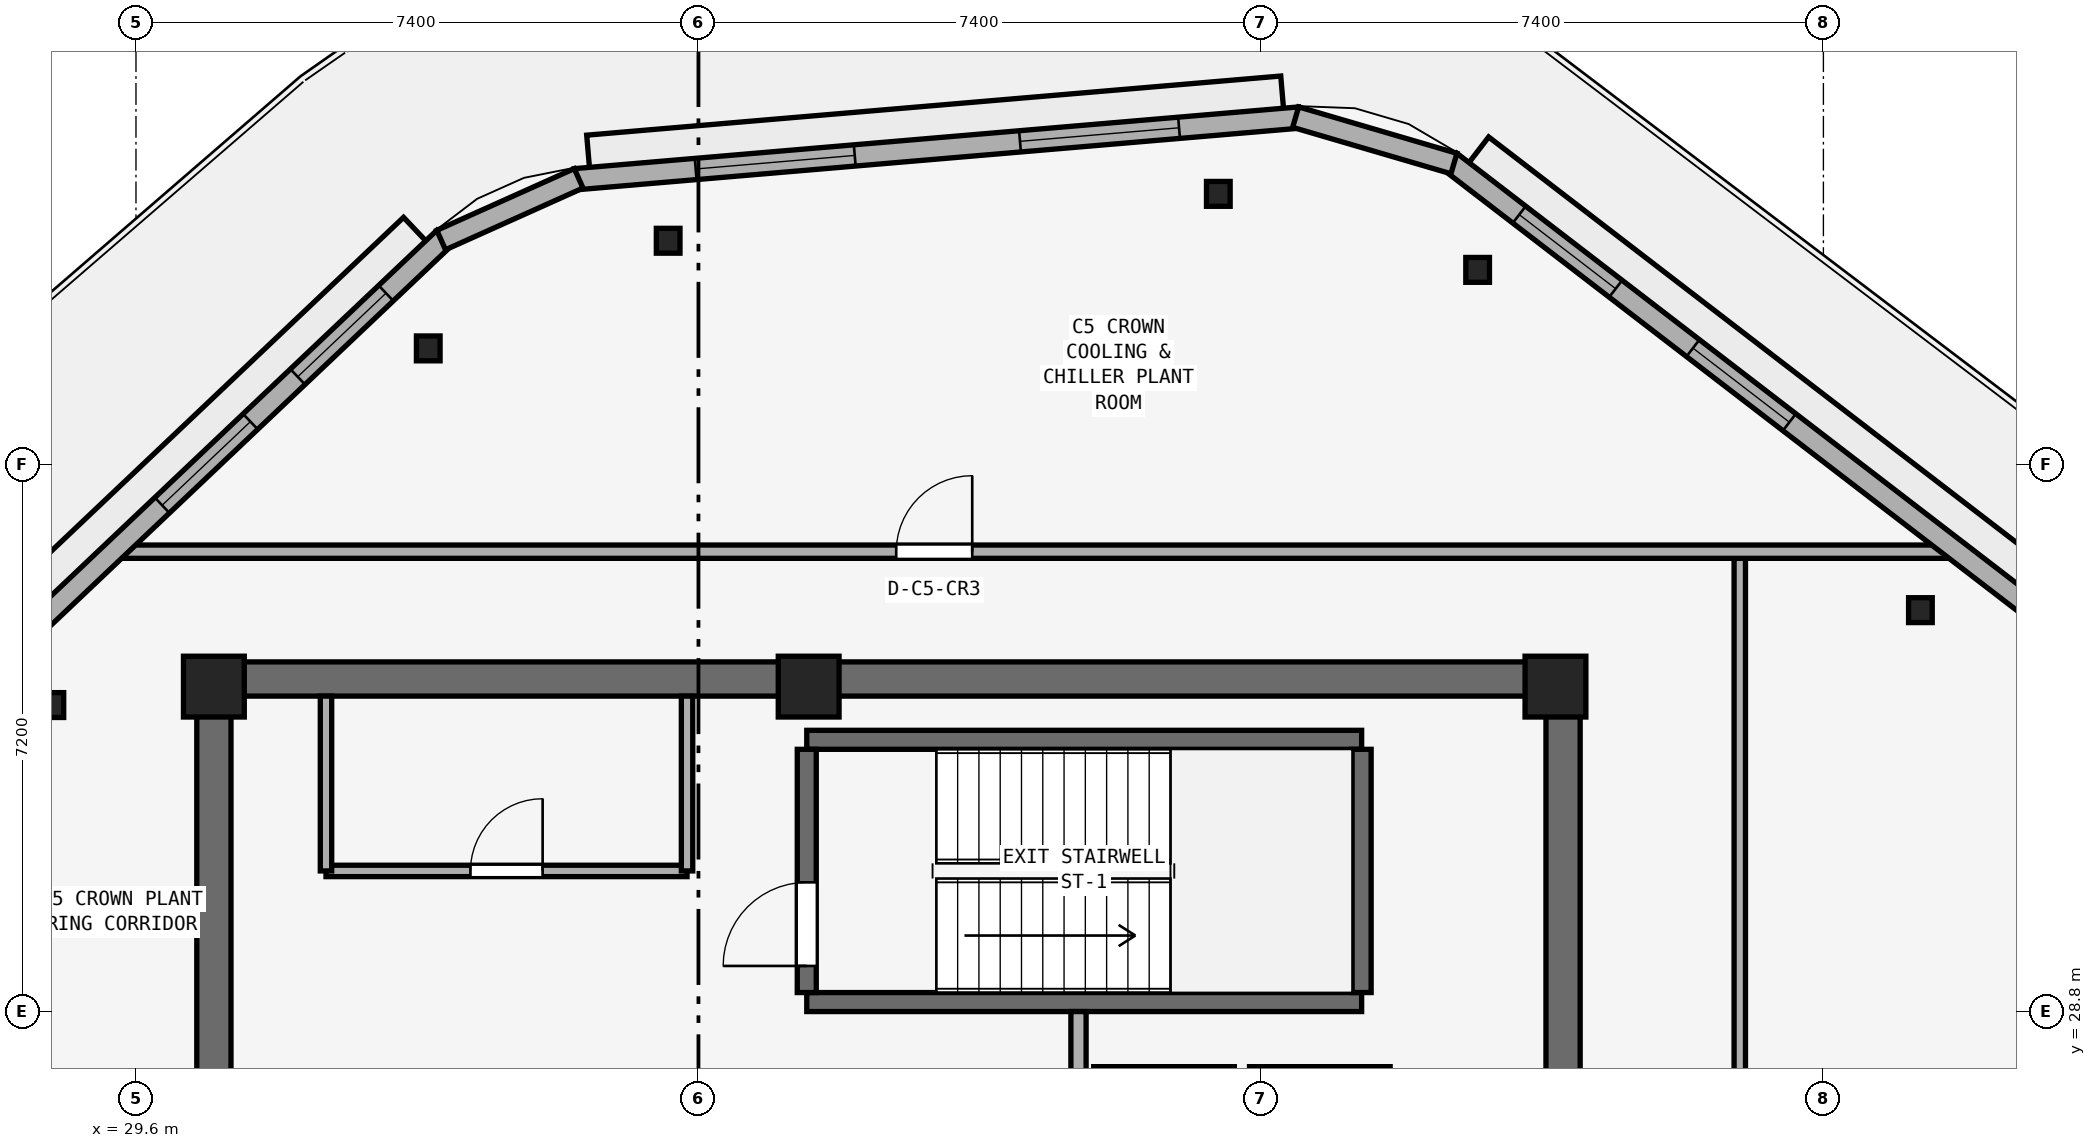
"""IFC4 building model, lengths in metres.
Left out: names, types, materials, properties, quantities, classifications, styles, units other than length and angle.
Written with IfcOpenShell. Run it as: python <this file> out.ifc"""

import sys

from ifc_helpers import new_model, si_unit, direction, frame, frame_2d, origin, origin_2d, place, context, subcontext, project, spatial, rectangle, i_section, extrude, element, fill, save


model = new_model("IFC4")
c1 = context("Model", 3, precision=1e-05, world=origin(), true_north=direction((0.0, 1.0)))
c2 = subcontext(c1, "Body", "Model", "MODEL_VIEW")
j1 = project(units=[si_unit("LENGTHUNIT", "METRE"), si_unit("PLANEANGLEUNIT", "RADIAN")], contexts=[c1])
p1 = place(None, origin())
s1 = spatial("IfcSite", under=j1, at=p1, CompositionType="ELEMENT")
p2 = place(p1, origin())
s2 = spatial("IfcBuilding", under=s1, at=p2, CompositionType="ELEMENT")
p3 = place(p2, frame((0.0, 0.0, 329.4)))
s3 = spatial("IfcBuildingStorey", under=s2, at=p3, CompositionType="ELEMENT", Elevation=329.4)
p4 = place(p3, frame((30.4, 33.175, 0.0), z_axis=(0.0, 0.0, 1.0), x_axis=(1.0, 0.0, 0.0)))
e1 = element("IfcWall", 1, at=p4, inside=s3, PredefinedType="SHEAR", context=c2, shape_type="SweptSolid", body=[
    extrude(rectangle(XDim=18.2, YDim=0.45, at=frame_2d((9.1, 0.0))), origin(), (0.0, 0.0, 1.0), 3.72),
])
p5 = place(p3, frame((30.625, 17.45, 0.0), z_axis=(0.0, 0.0, 1.0), x_axis=(0.0, 1.0, 0.0)))
e2 = element("IfcWall", 2, at=p5, inside=s3, PredefinedType="SHEAR", context=c2, shape_type="SweptSolid", body=[
    extrude(rectangle(XDim=15.5, YDim=0.45, at=frame_2d((7.75, 0.0))), origin(), (0.0, 0.0, 1.0), 3.72),
])
p6 = place(p5, frame((7.0, 0.0, 0.0)))
e3 = element("IfcOpeningElement", 3, at=p6, cuts=e2, PredefinedType="OPENING", context=c2, shape_type="SweptSolid", body=[
    extrude(rectangle(XDim=1.5, YDim=2.15, at=frame_2d((0.75, 1.075))), frame((0.0, 0.235, 0.0), z_axis=(0.0, -1.0, 0.0), x_axis=(1.0, 0.0, 0.0)), (0.0, 0.0, 1.0), 0.47),
])
p7 = place(p3, frame((48.375, 17.45, 0.0), z_axis=(0.0, 0.0, 1.0), x_axis=(0.0, 1.0, 0.0)))
e4 = element("IfcWall", 4, at=p7, inside=s3, PredefinedType="SHEAR", context=c2, shape_type="SweptSolid", body=[
    extrude(rectangle(XDim=15.5, YDim=0.45, at=frame_2d((7.75, 0.0))), origin(), (0.0, 0.0, 1.0), 3.72),
])
p8 = place(p7, frame((5.85, 0.0, 0.0)))
e5 = element("IfcOpeningElement", 5, at=p8, cuts=e4, PredefinedType="OPENING", context=c2, shape_type="SweptSolid", body=[
    extrude(rectangle(XDim=1.5, YDim=2.15, at=frame_2d((0.75, 1.075))), frame((0.0, 0.235, 0.0), z_axis=(0.0, -1.0, 0.0), x_axis=(1.0, 0.0, 0.0)), (0.0, 0.0, 1.0), 0.47),
])
for number, where, z_axis, x_axis in (
    (6, (48.275, 33.075, 0.0), (0.0, 0.0, 1.0), (1.0, 0.0, 0.0)),
    (7, (38.45, 33.075, 0.0), (0.0, 0.0, 1.0), (1.0, 0.0, 0.0)),
    (8, (30.625, 33.075, 0.0), (0.0, 0.0, 1.0), (1.0, 0.0, 0.0)),
):
    element("IfcColumn", number, at=place(p3, frame(where, z_axis=z_axis, x_axis=x_axis)), inside=s3, PredefinedType="PILASTER", context=c2, shape_type="SweptSolid", body=[
        extrude(rectangle(XDim=0.8, YDim=0.8, at=origin_2d()), origin(), (0.0, 0.0, 1.0), 4.0),
    ])
for number, where, z_axis, x_axis in (
    (9, (53.076, 34.081, 0.0), (0.0, 0.0, 1.0), (1.0, 0.0, 0.0)),
    (10, (47.251, 38.558, 0.0), (0.0, 0.0, 1.0), (1.0, 0.0, 0.0)),
    (11, (43.84, 39.557, 0.0), (0.0, 0.0, 1.0), (1.0, 0.0, 0.0)),
    (12, (36.602, 38.941, 0.0), (0.0, 0.0, 1.0), (1.0, 0.0, 0.0)),
    (13, (33.445, 37.524, 0.0), (0.0, 0.0, 1.0), (1.0, 0.0, 0.0)),
    (14, (28.493, 32.832, 0.0), (0.0, 0.0, 1.0), (1.0, 0.0, 0.0)),
):
    element("IfcColumn", number, at=place(p3, frame(where, z_axis=z_axis, x_axis=x_axis)), inside=s3, PredefinedType="COLUMN", context=c2, shape_type="SweptSolid", body=[
        extrude(i_section(OverallWidth=0.311, OverallDepth=0.327, WebThickness=0.016, FlangeThickness=0.025, at=origin_2d()), origin(), (0.0, 0.0, 1.0), 4.0),
    ])
for number, where, z_axis, x_axis in (
    (15, (38.425, 28.925, 0.0), (0.0, 0.0, 1.0), (1.0, 0.0, 0.0)),
    (16, (38.425, 32.375, 0.0), (0.0, 0.0, 1.0), (1.0, 0.0, 0.0)),
):
    element("IfcWall", number, at=place(p3, frame(where, z_axis=z_axis, x_axis=x_axis)), inside=s3, PredefinedType="SHEAR", context=c2, shape_type="SweptSolid", body=[
        extrude(rectangle(XDim=7.3, YDim=0.25, at=frame_2d((3.65, 0.0))), origin(), (0.0, 0.0, 1.0), 3.72),
    ])
p9 = place(p3, frame((38.425, 29.05, 0.0), z_axis=(0.0, 0.0, 1.0), x_axis=(0.0, 1.0, 0.0)))
e17 = element("IfcWall", 17, at=p9, inside=s3, PredefinedType="SHEAR", context=c2, shape_type="SweptSolid", body=[
    extrude(rectangle(XDim=3.2, YDim=0.25, at=frame_2d((1.6, 0.0))), origin(), (0.0, 0.0, 1.0), 3.72),
])
p10 = place(p9, frame((0.35, 0.0, 0.0)))
e18 = element("IfcOpeningElement", 18, at=p10, cuts=e17, PredefinedType="OPENING", context=c2, shape_type="SweptSolid", body=[
    extrude(rectangle(XDim=1.1, YDim=2.15, at=frame_2d((0.55, 1.075))), frame((0.0, 0.135, 0.0), z_axis=(0.0, -1.0, 0.0), x_axis=(1.0, 0.0, 0.0)), (0.0, 0.0, 1.0), 0.27),
])
p11 = place(p3, frame((45.725, 29.05, 0.0), z_axis=(0.0, 0.0, 1.0), x_axis=(0.0, 1.0, 0.0)))
e19 = element("IfcWall", 19, at=p11, inside=s3, PredefinedType="SHEAR", context=c2, shape_type="SweptSolid", body=[
    extrude(rectangle(XDim=3.2, YDim=0.25, at=frame_2d((1.6, 0.0))), origin(), (0.0, 0.0, 1.0), 3.72),
])
for number, where, z_axis, x_axis in (
    (20, (42.2, 27.95, 0.0), (0.0, 0.0, 1.0), (1.0, 0.0, 0.0)),
    (21, (44.25, 27.95, 0.0), (0.0, 0.0, 1.0), (1.0, 0.0, 0.0)),
):
    element("IfcWall", number, at=place(p3, frame(where, z_axis=z_axis, x_axis=x_axis)), inside=s3, PredefinedType="SHEAR", context=c2, shape_type="SweptSolid", body=[
        extrude(rectangle(XDim=1.85, YDim=0.25, at=frame_2d((0.925, 0.0))), origin(), (0.0, 0.0, 1.0), 3.72),
    ])
p12 = place(p3, frame((42.0, 22.75, 0.0), z_axis=(0.0, 0.0, 1.0), x_axis=(0.0, 1.0, 0.0)))
e22 = element("IfcWall", 22, at=p12, inside=s3, PredefinedType="SOLIDWALL", context=c2, shape_type="SweptSolid", body=[
    extrude(rectangle(XDim=6.05, YDim=0.2, at=frame_2d((3.025, 0.0))), origin(), (0.0, 0.0, 1.0), 3.72),
])
p13 = place(p12, frame((0.65, 0.0, 0.0)))
e23 = element("IfcOpeningElement", 23, at=p13, cuts=e22, PredefinedType="OPENING", context=c2, shape_type="SweptSolid", body=[
    extrude(rectangle(XDim=1.2, YDim=2.15, at=frame_2d((0.6, 1.075))), frame((0.0, 0.11, 0.0), z_axis=(0.0, -1.0, 0.0), x_axis=(1.0, 0.0, 0.0)), (0.0, 0.0, 1.0), 0.22),
])
p14 = place(p3, frame((32.1, 30.65, 0.0), z_axis=(0.0, 0.0, 1.0), x_axis=(1.0, 0.0, 0.0)))
e24 = element("IfcWall", 24, at=p14, inside=s3, PredefinedType="PARTITIONING", context=c2, shape_type="SweptSolid", body=[
    extrude(rectangle(XDim=4.75, YDim=0.15, at=frame_2d((2.375, 0.0))), origin(), (0.0, 0.0, 1.0), 3.72),
])
p15 = place(p14, frame((1.9, 0.0, 0.0)))
e25 = element("IfcOpeningElement", 25, at=p15, cuts=e24, PredefinedType="OPENING", context=c2, shape_type="SweptSolid", body=[
    extrude(rectangle(XDim=0.95, YDim=2.1, at=frame_2d((0.475, 1.05))), frame((0.0, 0.085, 0.0), z_axis=(0.0, -1.0, 0.0), x_axis=(1.0, 0.0, 0.0)), (0.0, 0.0, 1.0), 0.17),
])
for number, where, z_axis, x_axis in (
    (26, (32.1, 30.65, 0.0), (0.0, 0.0, 1.0), (0.0, 1.0, 0.0)),
    (27, (36.85, 30.65, 0.0), (0.0, 0.0, 1.0), (0.0, 1.0, 0.0)),
):
    element("IfcWall", number, at=place(p3, frame(where, z_axis=z_axis, x_axis=x_axis)), inside=s3, PredefinedType="PARTITIONING", context=c2, shape_type="SweptSolid", body=[
        extrude(rectangle(XDim=2.3, YDim=0.15, at=frame_2d((1.15, 0.0))), origin(), (0.0, 0.0, 1.0), 3.72),
    ])
p16 = place(p3, frame((50.7, 15.55, 0.0), z_axis=(0.0, 0.0, 1.0), x_axis=(0.0, 1.0, 0.0)))
e28 = element("IfcWall", 28, at=p16, inside=s3, PredefinedType="PARTITIONING", context=c2, shape_type="SweptSolid", body=[
    extrude(rectangle(XDim=19.3, YDim=0.15, at=frame_2d((9.65, 0.0))), origin(), (0.0, 0.0, 1.0), 3.72),
])
p17 = place(p16, frame((9.15, 0.0, 0.0)))
e29 = element("IfcOpeningElement", 29, at=p17, cuts=e28, PredefinedType="OPENING", context=c2, shape_type="SweptSolid", body=[
    extrude(rectangle(XDim=1.0, YDim=2.12, at=frame_2d((0.5, 1.06))), frame((0.0, 0.085, 0.0), z_axis=(0.0, -1.0, 0.0), x_axis=(1.0, 0.0, 0.0)), (0.0, 0.0, 1.0), 0.17),
])
p18 = place(p3, frame((29.236, 34.85, 0.0), z_axis=(0.0, 0.0, 1.0), x_axis=(1.0, 0.0, 0.0)))
e30 = element("IfcWall", 30, at=p18, inside=s3, PredefinedType="PARTITIONING", context=c2, shape_type="SweptSolid", body=[
    extrude(rectangle(XDim=24.422, YDim=0.175, at=frame_2d((12.211, 0.0))), origin(), (0.0, 0.0, 1.0), 3.72),
])
p19 = place(p18, frame((10.365, 0.0, 0.0)))
e31 = element("IfcOpeningElement", 31, at=p19, cuts=e30, PredefinedType="OPENING", context=c2, shape_type="SweptSolid", body=[
    extrude(rectangle(XDim=1.0, YDim=2.12, at=frame_2d((0.5, 1.06))), frame((0.0, 0.097, 0.0), z_axis=(0.0, -1.0, 0.0), x_axis=(1.0, 0.0, 0.0)), (0.0, 0.0, 1.0), 0.195),
])
p20 = place(p3, frame((54.543, 34.102, 0.0), z_axis=(0.0, 0.0, 1.0), x_axis=(-0.792926835332, 0.609316858302, 0.0)))
e32 = element("IfcWall", 32, at=p20, inside=s3, PredefinedType="STANDARD", context=c2, shape_type="SweptSolid", body=[
    extrude(rectangle(XDim=9.647, YDim=0.28, at=frame_2d((4.823, 0.0))), origin(), (0.0, 0.0, 1.0), 3.72),
])
p21 = place(p20, frame((4.023, 0.0, 0.9)))
e33 = element("IfcOpeningElement", 33, at=p21, cuts=e32, PredefinedType="OPENING", context=c2, shape_type="SweptSolid", body=[
    extrude(rectangle(XDim=1.6, YDim=1.45, at=frame_2d((0.8, 0.725))), frame((0.0, 0.15, 0.0), z_axis=(0.0, -1.0, 0.0), x_axis=(1.0, 0.0, 0.0)), (0.0, 0.0, 1.0), 0.3),
])
p22 = place(p20, frame((6.906, 0.0, 0.9)))
e34 = element("IfcOpeningElement", 34, at=p22, cuts=e32, PredefinedType="OPENING", context=c2, shape_type="SweptSolid", body=[
    extrude(rectangle(XDim=1.6, YDim=1.45, at=frame_2d((0.8, 0.725))), frame((0.0, 0.15, 0.0), z_axis=(0.0, -1.0, 0.0), x_axis=(1.0, 0.0, 0.0)), (0.0, 0.0, 1.0), 0.3),
])
p23 = place(p3, frame((44.908, 40.562, 0.0), z_axis=(0.0, 0.0, 1.0), x_axis=(-0.996389466658, -0.084900122101, 0.0)))
e35 = element("IfcWall", 35, at=p23, inside=s3, PredefinedType="STANDARD", context=c2, shape_type="SweptSolid", body=[
    extrude(rectangle(XDim=9.564, YDim=0.28, at=frame_2d((4.782, 0.0))), origin(), (0.0, 0.0, 1.0), 3.72),
])
p24 = place(p23, frame((1.591, 0.0, 0.9)))
e36 = element("IfcOpeningElement", 36, at=p24, cuts=e35, PredefinedType="OPENING", context=c2, shape_type="SweptSolid", body=[
    extrude(rectangle(XDim=2.1, YDim=1.7, at=frame_2d((1.05, 0.85))), frame((0.0, 0.15, 0.0), z_axis=(0.0, -1.0, 0.0), x_axis=(1.0, 0.0, 0.0)), (0.0, 0.0, 1.0), 0.3),
])
p25 = place(p23, frame((5.873, 0.0, 0.9)))
e37 = element("IfcOpeningElement", 37, at=p25, cuts=e35, PredefinedType="OPENING", context=c2, shape_type="SweptSolid", body=[
    extrude(rectangle(XDim=2.1, YDim=1.7, at=frame_2d((1.05, 0.85))), frame((0.0, 0.15, 0.0), z_axis=(0.0, -1.0, 0.0), x_axis=(1.0, 0.0, 0.0)), (0.0, 0.0, 1.0), 0.3),
])
p26 = place(p3, frame((33.654, 38.976, 0.0), z_axis=(0.0, 0.0, 1.0), x_axis=(-0.72588023988, -0.687821108539, 0.0)))
e38 = element("IfcWall", 38, at=p26, inside=s3, PredefinedType="STANDARD", context=c2, shape_type="SweptSolid", body=[
    extrude(rectangle(XDim=9.122, YDim=0.28, at=frame_2d((4.561, 0.0))), origin(), (0.0, 0.0, 1.0), 3.72),
])
p27 = place(p26, frame((1.054, 0.0, 0.9)))
e39 = element("IfcOpeningElement", 39, at=p27, cuts=e38, PredefinedType="OPENING", context=c2, shape_type="SweptSolid", body=[
    extrude(rectangle(XDim=1.6, YDim=1.45, at=frame_2d((0.8, 0.725))), frame((0.0, 0.15, 0.0), z_axis=(0.0, -1.0, 0.0), x_axis=(1.0, 0.0, 0.0)), (0.0, 0.0, 1.0), 0.3),
])
p28 = place(p26, frame((3.511, 0.0, 0.9)))
e40 = element("IfcOpeningElement", 40, at=p28, cuts=e38, PredefinedType="OPENING", context=c2, shape_type="SweptSolid", body=[
    extrude(rectangle(XDim=1.6, YDim=1.45, at=frame_2d((0.8, 0.725))), frame((0.0, 0.15, 0.0), z_axis=(0.0, -1.0, 0.0), x_axis=(1.0, 0.0, 0.0)), (0.0, 0.0, 1.0), 0.3),
])
p29 = place(p3, frame((46.939, 39.957, 0.0), z_axis=(0.0, 0.0, 1.0), x_axis=(-0.959642676919, 0.281222212202, 0.0)))
e41 = element("IfcWall", 41, at=p29, inside=s3, PredefinedType="STANDARD", context=c2, shape_type="SweptSolid", body=[
    extrude(rectangle(XDim=2.17, YDim=0.28, at=frame_2d((1.085, 0.0))), origin(), (0.0, 0.0, 1.0), 3.72),
])
p30 = place(p3, frame((35.424, 39.761, 0.0), z_axis=(0.0, 0.0, 1.0), x_axis=(-0.912384063645, -0.409335217648, 0.0)))
e42 = element("IfcWall", 42, at=p30, inside=s3, PredefinedType="STANDARD", context=c2, shape_type="SweptSolid", body=[
    extrude(rectangle(XDim=1.982, YDim=0.28, at=frame_2d((0.991, 0.0))), origin(), (0.0, 0.0, 1.0), 3.72),
])
p31 = place(p10, origin())
e43 = element("IfcDoor", 43, at=p31, inside=s3, OperationType="SINGLE_SWING_LEFT", PredefinedType="DOOR", context=c2, shape_type="SweptSolid", body=[
    extrude(rectangle(XDim=1.1, YDim=2.15, at=frame_2d((0.55, 1.075))), frame((0.0, 0.025, 0.0), z_axis=(0.0, -1.0, 0.0), x_axis=(1.0, 0.0, 0.0)), (0.0, 0.0, 1.0), 0.05),
])
fill(e18, e43)
p32 = place(p15, origin())
e44 = element("IfcDoor", 44, at=p32, inside=s3, OperationType="SINGLE_SWING_RIGHT", PredefinedType="DOOR", context=c2, shape_type="SweptSolid", body=[
    extrude(rectangle(XDim=0.95, YDim=2.1, at=frame_2d((0.475, 1.05))), frame((0.0, 0.025, 0.0), z_axis=(0.0, -1.0, 0.0), x_axis=(1.0, 0.0, 0.0)), (0.0, 0.0, 1.0), 0.05),
])
fill(e25, e44)
p33 = place(p19, origin())
e45 = element("IfcDoor", 45, at=p33, inside=s3, OperationType="SINGLE_SWING_RIGHT", PredefinedType="DOOR", context=c2, shape_type="SweptSolid", body=[
    extrude(rectangle(XDim=1.0, YDim=2.12, at=frame_2d((0.5, 1.06))), frame((0.0, 0.025, 0.0), z_axis=(0.0, -1.0, 0.0), x_axis=(1.0, 0.0, 0.0)), (0.0, 0.0, 1.0), 0.05),
])
fill(e31, e45)
p34 = place(p21, origin())
e46 = element("IfcWindow", 46, at=p34, inside=s3, PartitioningType="SINGLE_PANEL", PredefinedType="WINDOW", context=c2, shape_type="SweptSolid", body=[
    extrude(rectangle(XDim=1.6, YDim=1.45, at=frame_2d((0.8, 0.725))), frame((0.0, 0.03, 0.0), z_axis=(0.0, -1.0, 0.0), x_axis=(1.0, 0.0, 0.0)), (0.0, 0.0, 1.0), 0.06),
])
fill(e33, e46)
p35 = place(p22, origin())
e47 = element("IfcWindow", 47, at=p35, inside=s3, PartitioningType="SINGLE_PANEL", PredefinedType="WINDOW", context=c2, shape_type="SweptSolid", body=[
    extrude(rectangle(XDim=1.6, YDim=1.45, at=frame_2d((0.8, 0.725))), frame((0.0, 0.03, 0.0), z_axis=(0.0, -1.0, 0.0), x_axis=(1.0, 0.0, 0.0)), (0.0, 0.0, 1.0), 0.06),
])
fill(e34, e47)
p36 = place(p24, origin())
e48 = element("IfcWindow", 48, at=p36, inside=s3, PartitioningType="SINGLE_PANEL", PredefinedType="WINDOW", context=c2, shape_type="SweptSolid", body=[
    extrude(rectangle(XDim=2.1, YDim=1.7, at=frame_2d((1.05, 0.85))), frame((0.0, 0.03, 0.0), z_axis=(0.0, -1.0, 0.0), x_axis=(1.0, 0.0, 0.0)), (0.0, 0.0, 1.0), 0.06),
])
fill(e36, e48)
p37 = place(p25, origin())
e49 = element("IfcWindow", 49, at=p37, inside=s3, PartitioningType="SINGLE_PANEL", PredefinedType="WINDOW", context=c2, shape_type="SweptSolid", body=[
    extrude(rectangle(XDim=2.1, YDim=1.7, at=frame_2d((1.05, 0.85))), frame((0.0, 0.03, 0.0), z_axis=(0.0, -1.0, 0.0), x_axis=(1.0, 0.0, 0.0)), (0.0, 0.0, 1.0), 0.06),
])
fill(e37, e49)
p38 = place(p27, origin())
e50 = element("IfcWindow", 50, at=p38, inside=s3, PartitioningType="SINGLE_PANEL", PredefinedType="WINDOW", context=c2, shape_type="SweptSolid", body=[
    extrude(rectangle(XDim=1.6, YDim=1.45, at=frame_2d((0.8, 0.725))), frame((0.0, 0.03, 0.0), z_axis=(0.0, -1.0, 0.0), x_axis=(1.0, 0.0, 0.0)), (0.0, 0.0, 1.0), 0.06),
])
fill(e39, e50)
p39 = place(p28, origin())
e51 = element("IfcWindow", 51, at=p39, inside=s3, PartitioningType="SINGLE_PANEL", PredefinedType="WINDOW", context=c2, shape_type="SweptSolid", body=[
    extrude(rectangle(XDim=1.6, YDim=1.45, at=frame_2d((0.8, 0.725))), frame((0.0, 0.03, 0.0), z_axis=(0.0, -1.0, 0.0), x_axis=(1.0, 0.0, 0.0)), (0.0, 0.0, 1.0), 0.06),
])
fill(e40, e51)
save(model, sys.argv[1])
